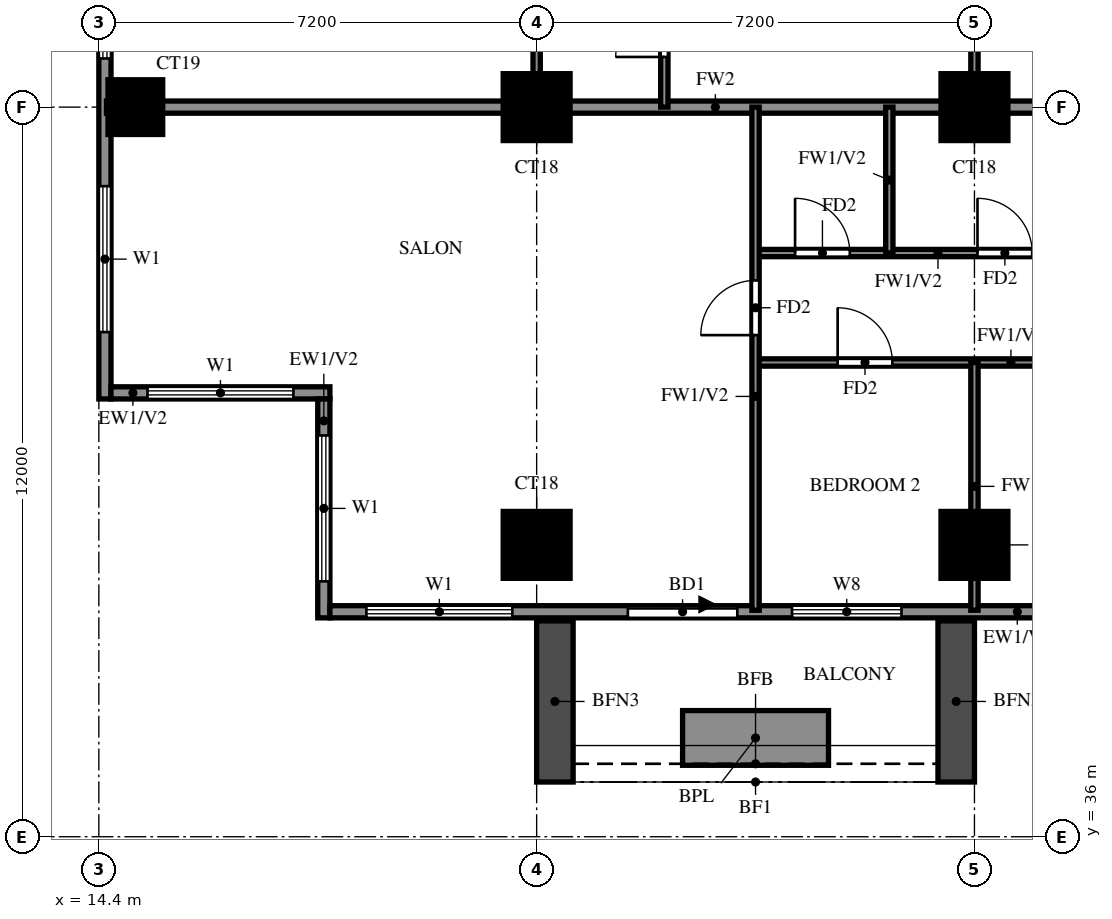
"""IFC4 building model, lengths in metres.
Left out: names, types, materials, properties, quantities, classifications, styles, units other than length and angle.
Written with IfcOpenShell. Run it as: python <this file> out.ifc"""

import sys

from ifc_helpers import new_model, si_unit, direction, frame, frame_2d, origin, origin_2d, place, context, subcontext, project, spatial, rectangle, extrude, source, transform, mapped, element, fill, save


model = new_model("IFC4")
c1 = context("Model", 3, precision=1e-05, world=origin(), true_north=direction((0.0, 1.0)))
c2 = subcontext(c1, "Body", "Model", "MODEL_VIEW")
j1 = project(units=[si_unit("LENGTHUNIT", "METRE"), si_unit("PLANEANGLEUNIT", "RADIAN")], contexts=[c1])
p1 = place(None, origin())
s1 = spatial("IfcSite", under=j1, at=p1, CompositionType="ELEMENT")
p2 = place(p1, origin())
s2 = spatial("IfcBuilding", under=s1, at=p2, CompositionType="ELEMENT")
p3 = place(p2, frame((0.0, 0.0, 116.5)))
s3 = spatial("IfcBuildingStorey", under=s2, at=p3, CompositionType="ELEMENT", Elevation=116.5)
m1 = source(origin(), c2, "Body", "SweptSolid", [
    extrude(rectangle(XDim=1.1, YDim=1.1, at=origin_2d()), origin(), (0.0, 0.0, 1.0), 3.2),
])
for number, where, z_axis, x_axis in (
    (1, (21.6, 40.8, 0.0), (0.0, 0.0, 1.0), (1.0, 0.0, 0.0)),
    (2, (28.8, 40.8, 0.0), (0.0, 0.0, 1.0), (1.0, 0.0, 0.0)),
):
    element("IfcColumn", number, at=place(p3, frame(where, z_axis=z_axis, x_axis=x_axis)), inside=s3, PredefinedType="COLUMN", context=c2, shape_type="MappedRepresentation", body=[
        mapped(m1, transform((0.0, 0.0, 0.0))),
    ])
m2 = source(origin(), c2, "Body", "SweptSolid", [
    extrude(rectangle(XDim=0.9, YDim=0.9, at=origin_2d()), origin(), (0.0, 0.0, 1.0), 3.2),
])
p4 = place(p3, frame((15.0, 48.0, 0.0), z_axis=(0.0, 0.0, 1.0), x_axis=(1.0, 0.0, 0.0)))
e3 = element("IfcColumn", 3, at=p4, inside=s3, PredefinedType="COLUMN", context=c2, shape_type="MappedRepresentation", body=[
    mapped(m2, transform((0.0, 0.0, 0.0))),
])
for number, where, z_axis, x_axis in (
    (4, (21.6, 48.0, 0.0), (0.0, 0.0, 1.0), (1.0, 0.0, 0.0)),
    (5, (28.8, 48.0, 0.0), (0.0, 0.0, 1.0), (1.0, 0.0, 0.0)),
):
    element("IfcColumn", number, at=place(p3, frame(where, z_axis=z_axis, x_axis=x_axis)), inside=s3, PredefinedType="COLUMN", context=c2, shape_type="MappedRepresentation", body=[
        mapped(m1, transform((0.0, 0.0, 0.0))),
    ])
p5 = place(p3, frame((14.5, 76.6, 0.0), z_axis=(0.0, 0.0, 1.0), x_axis=(0.0, -1.0, 0.0)))
e6 = element("IfcWall", 6, at=p5, inside=s3, PredefinedType="SOLIDWALL", context=c2, shape_type="SweptSolid", body=[
    extrude(rectangle(XDim=33.4, YDim=0.2, at=frame_2d((16.7, 0.0))), origin(), (0.0, 0.0, 1.0), 3.2),
])
p6 = place(p5, frame((29.9, 0.0, 0.6)))
e7 = element("IfcOpeningElement", 7, at=p6, cuts=e6, PredefinedType="OPENING", context=c2, shape_type="SweptSolid", body=[
    extrude(rectangle(XDim=2.4, YDim=2.4, at=frame_2d((1.2, 1.2))), frame((0.0, 0.11, 0.0), z_axis=(0.0, -1.0, 0.0), x_axis=(1.0, 0.0, 0.0)), (0.0, 0.0, 1.0), 0.22),
])
p7 = place(p5, frame((25.4, 0.0, 0.6)))
e8 = element("IfcOpeningElement", 8, at=p7, cuts=e6, PredefinedType="OPENING", context=c2, shape_type="SweptSolid", body=[
    extrude(rectangle(XDim=2.4, YDim=2.4, at=frame_2d((1.2, 1.2))), frame((0.0, 0.11, 0.0), z_axis=(0.0, -1.0, 0.0), x_axis=(1.0, 0.0, 0.0)), (0.0, 0.0, 1.0), 0.22),
])
p8 = place(p5, frame((18.2, 0.0, 0.6)))
e9 = element("IfcOpeningElement", 9, at=p8, cuts=e6, PredefinedType="OPENING", context=c2, shape_type="SweptSolid", body=[
    extrude(rectangle(XDim=2.4, YDim=2.4, at=frame_2d((1.2, 1.2))), frame((0.0, 0.11, 0.0), z_axis=(0.0, -1.0, 0.0), x_axis=(1.0, 0.0, 0.0)), (0.0, 0.0, 1.0), 0.22),
])
p9 = place(p5, frame((22.5, 0.0, 0.6)))
e10 = element("IfcOpeningElement", 10, at=p9, cuts=e6, PredefinedType="OPENING", context=c2, shape_type="SweptSolid", body=[
    extrude(rectangle(XDim=1.8, YDim=2.4, at=frame_2d((0.9, 1.2))), frame((0.0, 0.11, 0.0), z_axis=(0.0, -1.0, 0.0), x_axis=(1.0, 0.0, 0.0)), (0.0, 0.0, 1.0), 0.22),
])
p10 = place(p5, frame((15.3, 0.0, 0.6)))
e11 = element("IfcOpeningElement", 11, at=p10, cuts=e6, PredefinedType="OPENING", context=c2, shape_type="SweptSolid", body=[
    extrude(rectangle(XDim=1.8, YDim=2.4, at=frame_2d((0.9, 1.2))), frame((0.0, 0.11, 0.0), z_axis=(0.0, -1.0, 0.0), x_axis=(1.0, 0.0, 0.0)), (0.0, 0.0, 1.0), 0.22),
])
p11 = place(p5, frame((11.0, 0.0, 0.6)))
e12 = element("IfcOpeningElement", 12, at=p11, cuts=e6, PredefinedType="OPENING", context=c2, shape_type="SweptSolid", body=[
    extrude(rectangle(XDim=2.4, YDim=2.4, at=frame_2d((1.2, 1.2))), frame((0.0, 0.11, 0.0), z_axis=(0.0, -1.0, 0.0), x_axis=(1.0, 0.0, 0.0)), (0.0, 0.0, 1.0), 0.22),
])
p12 = place(p5, frame((7.8, 0.0, 0.6)))
e13 = element("IfcOpeningElement", 13, at=p12, cuts=e6, PredefinedType="OPENING", context=c2, shape_type="SweptSolid", body=[
    extrude(rectangle(XDim=2.4, YDim=2.4, at=frame_2d((1.2, 1.2))), frame((0.0, 0.11, 0.0), z_axis=(0.0, -1.0, 0.0), x_axis=(1.0, 0.0, 0.0)), (0.0, 0.0, 1.0), 0.22),
])
p13 = place(p5, frame((4.55, 0.0, 1.5)))
e14 = element("IfcOpeningElement", 14, at=p13, cuts=e6, PredefinedType="OPENING", context=c2, shape_type="SweptSolid", body=[
    extrude(rectangle(XDim=0.9, YDim=0.9, at=frame_2d((0.45, 0.45))), frame((0.0, 0.11, 0.0), z_axis=(0.0, -1.0, 0.0), x_axis=(1.0, 0.0, 0.0)), (0.0, 0.0, 1.0), 0.22),
])
p14 = place(p5, frame((0.6, 0.0, 0.6)))
e15 = element("IfcOpeningElement", 15, at=p14, cuts=e6, PredefinedType="OPENING", context=c2, shape_type="SweptSolid", body=[
    extrude(rectangle(XDim=2.4, YDim=2.4, at=frame_2d((1.2, 1.2))), frame((0.0, 0.11, 0.0), z_axis=(0.0, -1.0, 0.0), x_axis=(1.0, 0.0, 0.0)), (0.0, 0.0, 1.0), 0.22),
])
p15 = place(p3, frame((14.6, 43.3, 0.0), z_axis=(0.0, 0.0, 1.0), x_axis=(1.0, 0.0, 0.0)))
e16 = element("IfcWall", 16, at=p15, inside=s3, PredefinedType="SOLIDWALL", context=c2, shape_type="SweptSolid", body=[
    extrude(rectangle(XDim=3.6, YDim=0.2, at=frame_2d((1.8, 0.0))), origin(), (0.0, 0.0, 1.0), 3.2),
])
p16 = place(p15, frame((0.6, 0.0, 0.6)))
e17 = element("IfcOpeningElement", 17, at=p16, cuts=e16, PredefinedType="OPENING", context=c2, shape_type="SweptSolid", body=[
    extrude(rectangle(XDim=2.4, YDim=2.4, at=frame_2d((1.2, 1.2))), frame((0.0, 0.11, 0.0), z_axis=(0.0, -1.0, 0.0), x_axis=(1.0, 0.0, 0.0)), (0.0, 0.0, 1.0), 0.22),
])
p17 = place(p3, frame((18.1, 43.2, 0.0), z_axis=(0.0, 0.0, 1.0), x_axis=(0.0, -1.0, 0.0)))
e18 = element("IfcWall", 18, at=p17, inside=s3, PredefinedType="SOLIDWALL", context=c2, shape_type="SweptSolid", body=[
    extrude(rectangle(XDim=3.6, YDim=0.2, at=frame_2d((1.8, 0.0))), origin(), (0.0, 0.0, 1.0), 3.2),
])
p18 = place(p17, frame((0.6, 0.0, 0.6)))
e19 = element("IfcOpeningElement", 19, at=p18, cuts=e18, PredefinedType="OPENING", context=c2, shape_type="SweptSolid", body=[
    extrude(rectangle(XDim=2.4, YDim=2.4, at=frame_2d((1.2, 1.2))), frame((0.0, 0.11, 0.0), z_axis=(0.0, -1.0, 0.0), x_axis=(1.0, 0.0, 0.0)), (0.0, 0.0, 1.0), 0.22),
])
p19 = place(p3, frame((18.2, 39.7, 0.0), z_axis=(0.0, 0.0, 1.0), x_axis=(1.0, 0.0, 0.0)))
e20 = element("IfcWall", 20, at=p19, inside=s3, PredefinedType="SOLIDWALL", context=c2, shape_type="SweptSolid", body=[
    extrude(rectangle(XDim=23.8, YDim=0.2, at=frame_2d((11.9, 0.0))), origin(), (0.0, 0.0, 1.0), 3.2),
])
p20 = place(p19, frame((4.9, 0.0, 0.0)))
e21 = element("IfcOpeningElement", 21, at=p20, cuts=e20, PredefinedType="OPENING", context=c2, shape_type="SweptSolid", body=[
    extrude(rectangle(XDim=1.8, YDim=2.4, at=frame_2d((0.9, 1.2))), frame((0.0, 0.11, 0.0), z_axis=(0.0, -1.0, 0.0), x_axis=(1.0, 0.0, 0.0)), (0.0, 0.0, 1.0), 0.22),
])
p21 = place(p19, frame((0.6, 0.0, 0.6)))
e22 = element("IfcOpeningElement", 22, at=p21, cuts=e20, PredefinedType="OPENING", context=c2, shape_type="SweptSolid", body=[
    extrude(rectangle(XDim=2.4, YDim=2.4, at=frame_2d((1.2, 1.2))), frame((0.0, 0.11, 0.0), z_axis=(0.0, -1.0, 0.0), x_axis=(1.0, 0.0, 0.0)), (0.0, 0.0, 1.0), 0.22),
])
p22 = place(p19, frame((7.6, 0.0, 0.6)))
e23 = element("IfcOpeningElement", 23, at=p22, cuts=e20, PredefinedType="OPENING", context=c2, shape_type="SweptSolid", body=[
    extrude(rectangle(XDim=1.8, YDim=2.4, at=frame_2d((0.9, 1.2))), frame((0.0, 0.11, 0.0), z_axis=(0.0, -1.0, 0.0), x_axis=(1.0, 0.0, 0.0)), (0.0, 0.0, 1.0), 0.22),
])
p23 = place(p19, frame((11.8, 0.0, 0.6)))
e24 = element("IfcOpeningElement", 24, at=p23, cuts=e20, PredefinedType="OPENING", context=c2, shape_type="SweptSolid", body=[
    extrude(rectangle(XDim=2.4, YDim=2.4, at=frame_2d((1.2, 1.2))), frame((0.0, 0.11, 0.0), z_axis=(0.0, -1.0, 0.0), x_axis=(1.0, 0.0, 0.0)), (0.0, 0.0, 1.0), 0.22),
])
for number, where, z_axis, x_axis in (
    (25, (21.9, 39.55, 0.0), (0.0, 0.0, 1.0), (0.0, -1.0, 0.0)),
    (26, (28.5, 39.55, 0.0), (0.0, 0.0, 1.0), (0.0, -1.0, 0.0)),
):
    element("IfcWall", number, at=place(p3, frame(where, z_axis=z_axis, x_axis=x_axis)), inside=s3, PredefinedType="SOLIDWALL", context=c2, shape_type="SweptSolid", body=[
        extrude(rectangle(XDim=2.65, YDim=0.6, at=frame_2d((1.325, 0.0))), origin(), (0.0, 0.0, 1.0), 2.85),
    ])
p24 = place(p3, frame((24.0, 37.625, 0.0), z_axis=(0.0, 0.0, 1.0), x_axis=(1.0, 0.0, 0.0)))
e27 = element("IfcWall", 27, at=p24, inside=s3, PredefinedType="SOLIDWALL", context=c2, shape_type="SweptSolid", body=[
    extrude(rectangle(XDim=2.4, YDim=0.9, at=frame_2d((1.2, 0.0))), origin(), (0.0, 0.0, 1.0), 0.9),
])
p25 = place(p3, frame((14.525, 48.0, 0.0), z_axis=(0.0, 0.0, 1.0), x_axis=(1.0, 0.0, 0.0)))
e28 = element("IfcWall", 28, at=p25, inside=s3, PredefinedType="SOLIDWALL", context=c2, shape_type="SweptSolid", body=[
    extrude(rectangle(XDim=19.075, YDim=0.2, at=frame_2d((9.538, 0.0))), origin(), (0.0, 0.0, 1.0), 3.2),
])
p26 = place(p3, frame((25.2, 43.8, 0.0), z_axis=(0.0, 0.0, 1.0), x_axis=(1.0, 0.0, 0.0)))
e29 = element("IfcWall", 29, at=p26, inside=s3, PredefinedType="PARTITIONING", context=c2, shape_type="SweptSolid", body=[
    extrude(rectangle(XDim=8.4, YDim=0.12, at=frame_2d((4.2, 0.0))), origin(), (0.0, 0.0, 1.0), 3.2),
])
p27 = place(p26, frame((1.35, 0.0, 0.0)))
e30 = element("IfcOpeningElement", 30, at=p27, cuts=e29, PredefinedType="OPENING", context=c2, shape_type="SweptSolid", body=[
    extrude(rectangle(XDim=0.9, YDim=2.1, at=frame_2d((0.45, 1.05))), frame((0.0, 0.07, 0.0), z_axis=(0.0, -1.0, 0.0), x_axis=(1.0, 0.0, 0.0)), (0.0, 0.0, 1.0), 0.14),
])
p28 = place(p26, frame((5.55, 0.0, 0.0)))
e31 = element("IfcOpeningElement", 31, at=p28, cuts=e29, PredefinedType="OPENING", context=c2, shape_type="SweptSolid", body=[
    extrude(rectangle(XDim=0.9, YDim=2.1, at=frame_2d((0.45, 1.05))), frame((0.0, 0.07, 0.0), z_axis=(0.0, -1.0, 0.0), x_axis=(1.0, 0.0, 0.0)), (0.0, 0.0, 1.0), 0.14),
])
p29 = place(p3, frame((25.2, 45.6, 0.0), z_axis=(0.0, 0.0, 1.0), x_axis=(1.0, 0.0, 0.0)))
e32 = element("IfcWall", 32, at=p29, inside=s3, PredefinedType="PARTITIONING", context=c2, shape_type="SweptSolid", body=[
    extrude(rectangle(XDim=6.0, YDim=0.12, at=frame_2d((3.0, 0.0))), origin(), (0.0, 0.0, 1.0), 3.2),
])
p30 = place(p29, frame((0.65, 0.0, 0.0)))
e33 = element("IfcOpeningElement", 33, at=p30, cuts=e32, PredefinedType="OPENING", context=c2, shape_type="SweptSolid", body=[
    extrude(rectangle(XDim=0.9, YDim=2.1, at=frame_2d((0.45, 1.05))), frame((0.0, 0.07, 0.0), z_axis=(0.0, -1.0, 0.0), x_axis=(1.0, 0.0, 0.0)), (0.0, 0.0, 1.0), 0.14),
])
p31 = place(p29, frame((3.65, 0.0, 0.0)))
e34 = element("IfcOpeningElement", 34, at=p31, cuts=e32, PredefinedType="OPENING", context=c2, shape_type="SweptSolid", body=[
    extrude(rectangle(XDim=0.9, YDim=2.1, at=frame_2d((0.45, 1.05))), frame((0.0, 0.07, 0.0), z_axis=(0.0, -1.0, 0.0), x_axis=(1.0, 0.0, 0.0)), (0.0, 0.0, 1.0), 0.14),
])
p32 = place(p3, frame((21.6, 48.0, 0.0), z_axis=(0.0, 0.0, 1.0), x_axis=(0.0, 1.0, 0.0)))
e35 = element("IfcWall", 35, at=p32, inside=s3, PredefinedType="PARTITIONING", context=c2, shape_type="SweptSolid", body=[
    extrude(rectangle(XDim=21.6, YDim=0.12, at=frame_2d((10.8, 0.0))), origin(), (0.0, 0.0, 1.0), 3.2),
])
p33 = place(p32, frame((1.35, 0.0, 0.0)))
e36 = element("IfcOpeningElement", 36, at=p33, cuts=e35, PredefinedType="OPENING", context=c2, shape_type="SweptSolid", body=[
    extrude(rectangle(XDim=0.9, YDim=2.1, at=frame_2d((0.45, 1.05))), frame((0.0, 0.07, 0.0), z_axis=(0.0, -1.0, 0.0), x_axis=(1.0, 0.0, 0.0)), (0.0, 0.0, 1.0), 0.14),
])
p34 = place(p32, frame((7.95, 0.0, 0.0)))
e37 = element("IfcOpeningElement", 37, at=p34, cuts=e35, PredefinedType="OPENING", context=c2, shape_type="SweptSolid", body=[
    extrude(rectangle(XDim=1.5, YDim=2.1, at=frame_2d((0.75, 1.05))), frame((0.0, 0.07, 0.0), z_axis=(0.0, -1.0, 0.0), x_axis=(1.0, 0.0, 0.0)), (0.0, 0.0, 1.0), 0.14),
])
p35 = place(p32, frame((12.15, 0.0, 0.0)))
e38 = element("IfcOpeningElement", 38, at=p35, cuts=e35, PredefinedType="OPENING", context=c2, shape_type="SweptSolid", body=[
    extrude(rectangle(XDim=0.9, YDim=2.1, at=frame_2d((0.45, 1.05))), frame((0.0, 0.07, 0.0), z_axis=(0.0, -1.0, 0.0), x_axis=(1.0, 0.0, 0.0)), (0.0, 0.0, 1.0), 0.14),
])
p36 = place(p32, frame((15.75, 0.0, 0.0)))
e39 = element("IfcOpeningElement", 39, at=p36, cuts=e35, PredefinedType="OPENING", context=c2, shape_type="SweptSolid", body=[
    extrude(rectangle(XDim=0.9, YDim=2.1, at=frame_2d((0.45, 1.05))), frame((0.0, 0.07, 0.0), z_axis=(0.0, -1.0, 0.0), x_axis=(1.0, 0.0, 0.0)), (0.0, 0.0, 1.0), 0.14),
])
p37 = place(p32, frame((19.35, 0.0, 0.0)))
e40 = element("IfcOpeningElement", 40, at=p37, cuts=e35, PredefinedType="OPENING", context=c2, shape_type="SweptSolid", body=[
    extrude(rectangle(XDim=0.9, YDim=2.1, at=frame_2d((0.45, 1.05))), frame((0.0, 0.07, 0.0), z_axis=(0.0, -1.0, 0.0), x_axis=(1.0, 0.0, 0.0)), (0.0, 0.0, 1.0), 0.14),
])
p38 = place(p3, frame((23.7, 48.0, 0.0), z_axis=(0.0, 0.0, 1.0), x_axis=(0.0, 1.0, 0.0)))
e41 = element("IfcWall", 41, at=p38, inside=s3, PredefinedType="PARTITIONING", context=c2, shape_type="SweptSolid", body=[
    extrude(rectangle(XDim=7.2, YDim=0.12, at=frame_2d((3.6, 0.0))), origin(), (0.0, 0.0, 1.0), 3.2),
])
p39 = place(p38, frame((0.825, 0.0, 0.0)))
e42 = element("IfcOpeningElement", 42, at=p39, cuts=e41, PredefinedType="OPENING", context=c2, shape_type="SweptSolid", body=[
    extrude(rectangle(XDim=0.8, YDim=2.1, at=frame_2d((0.4, 1.05))), frame((0.0, 0.07, 0.0), z_axis=(0.0, -1.0, 0.0), x_axis=(1.0, 0.0, 0.0)), (0.0, 0.0, 1.0), 0.14),
])
p40 = place(p3, frame((25.2, 39.725, 0.0), z_axis=(0.0, 0.0, 1.0), x_axis=(0.0, 1.0, 0.0)))
e43 = element("IfcWall", 43, at=p40, inside=s3, PredefinedType="PARTITIONING", context=c2, shape_type="SweptSolid", body=[
    extrude(rectangle(XDim=8.275, YDim=0.12, at=frame_2d((4.137, 0.0))), origin(), (0.0, 0.0, 1.0), 3.2),
])
p41 = place(p40, frame((4.525, 0.0, 0.0)))
e44 = element("IfcOpeningElement", 44, at=p41, cuts=e43, PredefinedType="OPENING", context=c2, shape_type="SweptSolid", body=[
    extrude(rectangle(XDim=0.9, YDim=2.1, at=frame_2d((0.45, 1.05))), frame((0.0, 0.07, 0.0), z_axis=(0.0, -1.0, 0.0), x_axis=(1.0, 0.0, 0.0)), (0.0, 0.0, 1.0), 0.14),
])
p42 = place(p3, frame((27.4, 45.6, 0.0), z_axis=(0.0, 0.0, 1.0), x_axis=(0.0, 1.0, 0.0)))
e45 = element("IfcWall", 45, at=p42, inside=s3, PredefinedType="PARTITIONING", context=c2, shape_type="SweptSolid", body=[
    extrude(rectangle(XDim=2.4, YDim=0.12, at=frame_2d((1.2, 0.0))), origin(), (0.0, 0.0, 1.0), 3.2),
])
p43 = place(p3, frame((28.8, 39.725, 0.0), z_axis=(0.0, 0.0, 1.0), x_axis=(0.0, 1.0, 0.0)))
e46 = element("IfcWall", 46, at=p43, inside=s3, PredefinedType="PARTITIONING", context=c2, shape_type="SweptSolid", body=[
    extrude(rectangle(XDim=4.075, YDim=0.12, at=frame_2d((2.038, 0.0))), origin(), (0.0, 0.0, 1.0), 3.2),
])
p44 = place(p3, frame((28.8, 48.0, 0.0), z_axis=(0.0, 0.0, 1.0), x_axis=(0.0, 1.0, 0.0)))
e47 = element("IfcWall", 47, at=p44, inside=s3, PredefinedType="PARTITIONING", context=c2, shape_type="SweptSolid", body=[
    extrude(rectangle(XDim=7.2, YDim=0.12, at=frame_2d((3.6, 0.0))), origin(), (0.0, 0.0, 1.0), 3.2),
])
p45 = place(p6, origin())
e48 = element("IfcWindow", 48, at=p45, inside=s3, PartitioningType="DOUBLE_PANEL_VERTICAL", PredefinedType="WINDOW", context=c2, shape_type="SweptSolid", body=[
    extrude(rectangle(XDim=2.4, YDim=2.4, at=frame_2d((1.2, 1.2))), frame((0.0, 0.03, 0.0), z_axis=(0.0, -1.0, 0.0), x_axis=(1.0, 0.0, 0.0)), (0.0, 0.0, 1.0), 0.06),
])
fill(e7, e48)
p46 = place(p7, origin())
e49 = element("IfcWindow", 49, at=p46, inside=s3, PartitioningType="DOUBLE_PANEL_VERTICAL", PredefinedType="WINDOW", context=c2, shape_type="SweptSolid", body=[
    extrude(rectangle(XDim=2.4, YDim=2.4, at=frame_2d((1.2, 1.2))), frame((0.0, 0.03, 0.0), z_axis=(0.0, -1.0, 0.0), x_axis=(1.0, 0.0, 0.0)), (0.0, 0.0, 1.0), 0.06),
])
fill(e8, e49)
p47 = place(p16, origin())
e50 = element("IfcWindow", 50, at=p47, inside=s3, PartitioningType="DOUBLE_PANEL_VERTICAL", PredefinedType="WINDOW", context=c2, shape_type="SweptSolid", body=[
    extrude(rectangle(XDim=2.4, YDim=2.4, at=frame_2d((1.2, 1.2))), frame((0.0, 0.03, 0.0), z_axis=(0.0, -1.0, 0.0), x_axis=(1.0, 0.0, 0.0)), (0.0, 0.0, 1.0), 0.06),
])
fill(e17, e50)
p48 = place(p18, origin())
e51 = element("IfcWindow", 51, at=p48, inside=s3, PartitioningType="DOUBLE_PANEL_VERTICAL", PredefinedType="WINDOW", context=c2, shape_type="SweptSolid", body=[
    extrude(rectangle(XDim=2.4, YDim=2.4, at=frame_2d((1.2, 1.2))), frame((0.0, 0.03, 0.0), z_axis=(0.0, -1.0, 0.0), x_axis=(1.0, 0.0, 0.0)), (0.0, 0.0, 1.0), 0.06),
])
fill(e19, e51)
p49 = place(p20, origin())
e52 = element("IfcDoor", 52, at=p49, inside=s3, OperationType="DOUBLE_DOOR_SLIDING", PredefinedType="DOOR", context=c2, shape_type="SweptSolid", body=[
    extrude(rectangle(XDim=1.8, YDim=2.4, at=frame_2d((0.9, 1.2))), frame((0.0, 0.025, 0.0), z_axis=(0.0, -1.0, 0.0), x_axis=(1.0, 0.0, 0.0)), (0.0, 0.0, 1.0), 0.05),
])
fill(e21, e52)
p50 = place(p21, origin())
e53 = element("IfcWindow", 53, at=p50, inside=s3, PartitioningType="DOUBLE_PANEL_VERTICAL", PredefinedType="WINDOW", context=c2, shape_type="SweptSolid", body=[
    extrude(rectangle(XDim=2.4, YDim=2.4, at=frame_2d((1.2, 1.2))), frame((0.0, 0.03, 0.0), z_axis=(0.0, -1.0, 0.0), x_axis=(1.0, 0.0, 0.0)), (0.0, 0.0, 1.0), 0.06),
])
fill(e22, e53)
p51 = place(p22, origin())
e54 = element("IfcWindow", 54, at=p51, inside=s3, PartitioningType="DOUBLE_PANEL_VERTICAL", PredefinedType="WINDOW", context=c2, shape_type="SweptSolid", body=[
    extrude(rectangle(XDim=1.8, YDim=2.4, at=frame_2d((0.9, 1.2))), frame((0.0, 0.03, 0.0), z_axis=(0.0, -1.0, 0.0), x_axis=(1.0, 0.0, 0.0)), (0.0, 0.0, 1.0), 0.06),
])
fill(e23, e54)
p52 = place(p41, origin())
e55 = element("IfcDoor", 55, at=p52, inside=s3, OperationType="SINGLE_SWING_LEFT", PredefinedType="DOOR", context=c2, shape_type="SweptSolid", body=[
    extrude(rectangle(XDim=0.9, YDim=2.1, at=frame_2d((0.45, 1.05))), frame((0.0, 0.025, 0.0), z_axis=(0.0, -1.0, 0.0), x_axis=(1.0, 0.0, 0.0)), (0.0, 0.0, 1.0), 0.05),
])
fill(e44, e55)
p53 = place(p27, origin())
e56 = element("IfcDoor", 56, at=p53, inside=s3, OperationType="SINGLE_SWING_LEFT", PredefinedType="DOOR", context=c2, shape_type="SweptSolid", body=[
    extrude(rectangle(XDim=0.9, YDim=2.1, at=frame_2d((0.45, 1.05))), frame((0.0, 0.025, 0.0), z_axis=(0.0, -1.0, 0.0), x_axis=(1.0, 0.0, 0.0)), (0.0, 0.0, 1.0), 0.05),
])
fill(e30, e56)
p54 = place(p30, origin())
e57 = element("IfcDoor", 57, at=p54, inside=s3, OperationType="SINGLE_SWING_LEFT", PredefinedType="DOOR", context=c2, shape_type="SweptSolid", body=[
    extrude(rectangle(XDim=0.9, YDim=2.1, at=frame_2d((0.45, 1.05))), frame((0.0, 0.025, 0.0), z_axis=(0.0, -1.0, 0.0), x_axis=(1.0, 0.0, 0.0)), (0.0, 0.0, 1.0), 0.05),
])
fill(e33, e57)
p55 = place(p31, origin())
e58 = element("IfcDoor", 58, at=p55, inside=s3, OperationType="SINGLE_SWING_LEFT", PredefinedType="DOOR", context=c2, shape_type="SweptSolid", body=[
    extrude(rectangle(XDim=0.9, YDim=2.1, at=frame_2d((0.45, 1.05))), frame((0.0, 0.025, 0.0), z_axis=(0.0, -1.0, 0.0), x_axis=(1.0, 0.0, 0.0)), (0.0, 0.0, 1.0), 0.05),
])
fill(e34, e58)
p56 = place(p39, origin())
e59 = element("IfcDoor", 59, at=p56, inside=s3, OperationType="SINGLE_SWING_LEFT", PredefinedType="DOOR", context=c2, shape_type="SweptSolid", body=[
    extrude(rectangle(XDim=0.8, YDim=2.1, at=frame_2d((0.4, 1.05))), frame((0.0, 0.025, 0.0), z_axis=(0.0, -1.0, 0.0), x_axis=(1.0, 0.0, 0.0)), (0.0, 0.0, 1.0), 0.05),
])
fill(e42, e59)
save(model, sys.argv[1])
